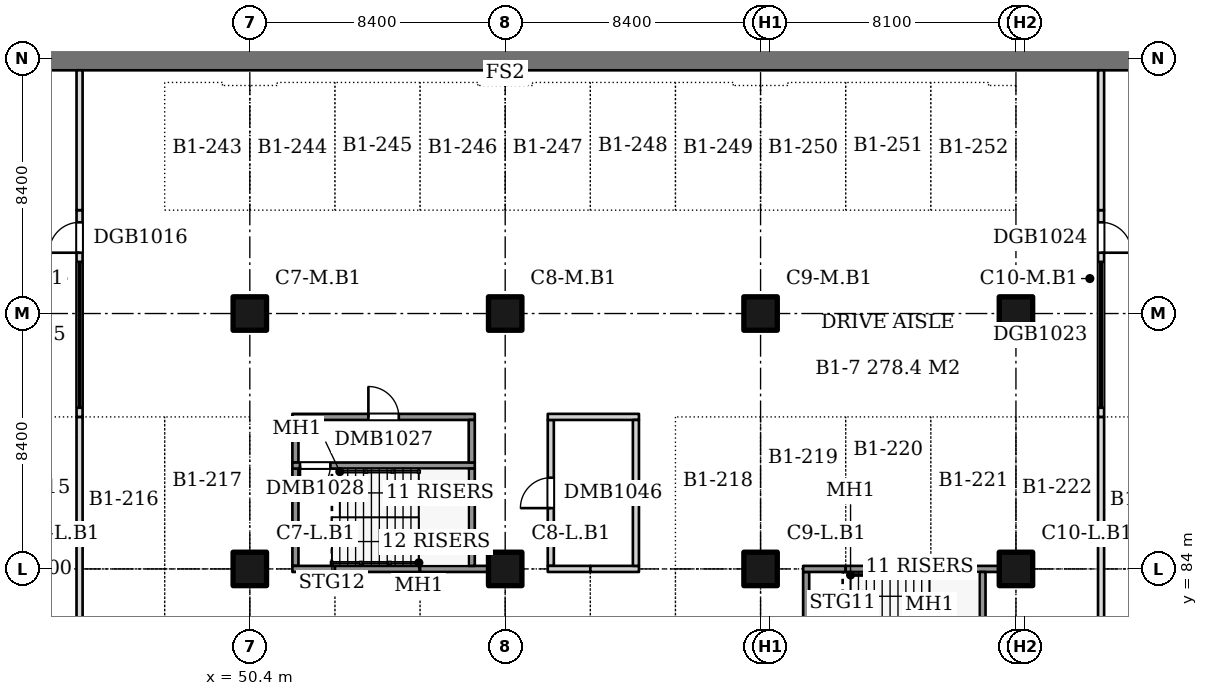
"""IFC4 building model, lengths in metres.
Left out: names, types, materials, properties, quantities, classifications, styles, units other than length and angle.
Written with IfcOpenShell. Run it as: python <this file> out.ifc"""

import sys

from ifc_helpers import new_model, si_unit, direction, frame, frame_2d, origin, origin_2d, place, context, subcontext, project, spatial, rectangle, extrude, element, fill, save


model = new_model("IFC4")
c1 = context("Model", 3, precision=1e-05, world=origin(), true_north=direction((0.0, 1.0)))
c2 = subcontext(c1, "Body", "Model", "MODEL_VIEW")
j1 = project(units=[si_unit("LENGTHUNIT", "METRE"), si_unit("PLANEANGLEUNIT", "RADIAN")], contexts=[c1])
p1 = place(None, origin())
s1 = spatial("IfcSite", under=j1, at=p1, CompositionType="ELEMENT")
p2 = place(p1, origin())
s2 = spatial("IfcBuilding", under=s1, at=p2, CompositionType="ELEMENT")
p3 = place(p2, frame((0.0, 0.0, -4.0)))
s3 = spatial("IfcBuildingStorey", under=s2, at=p3, CompositionType="ELEMENT", Elevation=-4.0)
p4 = place(p3, frame((-8.8, 100.8, 0.0), z_axis=(0.0, 0.0, 1.0), x_axis=(1.0, 0.0, 0.0)))
e1 = element("IfcWall", 1, at=p4, inside=s3, PredefinedType="SOLIDWALL", context=c2, shape_type="SweptSolid", body=[
    extrude(rectangle(XDim=135.2, YDim=0.8, at=frame_2d((67.6, 0.0))), origin(), (0.0, 0.0, 1.0), 3.6),
])
for number, where, z_axis, x_axis in (
    (2, (50.4, 84.0, 0.0), (0.0, 0.0, 1.0), (1.0, 0.0, 0.0)),
    (3, (50.4, 92.4, 0.0), (0.0, 0.0, 1.0), (1.0, 0.0, 0.0)),
    (4, (58.8, 84.0, 0.0), (0.0, 0.0, 1.0), (1.0, 0.0, 0.0)),
    (5, (58.8, 92.4, 0.0), (0.0, 0.0, 1.0), (1.0, 0.0, 0.0)),
    (6, (67.2, 84.0, 0.0), (0.0, 0.0, 1.0), (1.0, 0.0, 0.0)),
    (7, (67.2, 92.4, 0.0), (0.0, 0.0, 1.0), (1.0, 0.0, 0.0)),
    (8, (75.6, 84.0, 0.0), (0.0, 0.0, 1.0), (1.0, 0.0, 0.0)),
    (9, (75.6, 92.4, 0.0), (0.0, 0.0, 1.0), (1.0, 0.0, 0.0)),
):
    element("IfcColumn", number, at=place(p3, frame(where, z_axis=z_axis, x_axis=x_axis)), inside=s3, PredefinedType="COLUMN", context=c2, shape_type="SweptSolid", body=[
        extrude(rectangle(XDim=1.1, YDim=1.1, at=origin_2d()), origin(), (0.0, 0.0, 1.0), 3.6),
    ])
p5 = place(p3, frame((51.9, 84.1, 0.0), z_axis=(0.0, 0.0, 1.0), x_axis=(0.0, 1.0, 0.0)))
e10 = element("IfcWall", 10, at=p5, inside=s3, PredefinedType="SOLIDWALL", context=c2, shape_type="SweptSolid", body=[
    extrude(rectangle(XDim=3.2, YDim=0.2, at=frame_2d((1.6, 0.0))), origin(), (0.0, 0.0, 1.0), 4.0),
])
for number, where, z_axis, x_axis in (
    (11, (51.8, 84.0, 0.0), (0.0, 0.0, 1.0), (1.0, 0.0, 0.0)),
    (12, (51.9, 87.5, 0.0), (0.0, 0.0, 1.0), (0.0, 1.0, 0.0)),
):
    element("IfcWall", number, at=place(p3, frame(where, z_axis=z_axis, x_axis=x_axis)), inside=s3, PredefinedType="SOLIDWALL", context=c2, shape_type="SweptSolid", body=[
        extrude(rectangle(XDim=1.4, YDim=0.2, at=frame_2d((0.7, 0.0))), origin(), (0.0, 0.0, 1.0), 4.0),
    ])
p6 = place(p3, frame((51.8, 87.4, 0.0), z_axis=(0.0, 0.0, 1.0), x_axis=(1.0, 0.0, 0.0)))
e13 = element("IfcWall", 13, at=p6, inside=s3, PredefinedType="SOLIDWALL", context=c2, shape_type="SweptSolid", body=[
    extrude(rectangle(XDim=6.0, YDim=0.2, at=frame_2d((3.0, 0.0))), origin(), (0.0, 0.0, 1.0), 4.0),
])
p7 = place(p6, frame((0.25, 0.0, 0.0)))
e14 = element("IfcOpeningElement", 14, at=p7, cuts=e13, PredefinedType="OPENING", context=c2, shape_type="SweptSolid", body=[
    extrude(rectangle(XDim=1.0, YDim=2.1, at=frame_2d((0.5, 1.05))), frame((0.0, 0.11, 0.0), z_axis=(0.0, -1.0, 0.0), x_axis=(1.0, 0.0, 0.0)), (0.0, 0.0, 1.0), 0.22),
])
p8 = place(p3, frame((51.8, 89.0, 0.0), z_axis=(0.0, 0.0, 1.0), x_axis=(1.0, 0.0, 0.0)))
e15 = element("IfcWall", 15, at=p8, inside=s3, PredefinedType="SOLIDWALL", context=c2, shape_type="SweptSolid", body=[
    extrude(rectangle(XDim=6.0, YDim=0.2, at=frame_2d((3.0, 0.0))), origin(), (0.0, 0.0, 1.0), 4.0),
])
p9 = place(p8, frame((2.5, 0.0, 0.0)))
e16 = element("IfcOpeningElement", 16, at=p9, cuts=e15, PredefinedType="OPENING", context=c2, shape_type="SweptSolid", body=[
    extrude(rectangle(XDim=1.0, YDim=2.1, at=frame_2d((0.5, 1.05))), frame((0.0, 0.11, 0.0), z_axis=(0.0, -1.0, 0.0), x_axis=(1.0, 0.0, 0.0)), (0.0, 0.0, 1.0), 0.22),
])
p10 = place(p3, frame((53.2, 84.0, 0.0), z_axis=(0.0, 0.0, 1.0), x_axis=(1.0, 0.0, 0.0)))
e17 = element("IfcWall", 17, at=p10, inside=s3, PredefinedType="SOLIDWALL", context=c2, shape_type="SweptSolid", body=[
    extrude(rectangle(XDim=2.8, YDim=0.2, at=frame_2d((1.4, 0.0))), origin(), (0.0, 0.0, 1.0), 4.0),
])
p11 = place(p3, frame((56.0, 84.0, 0.0), z_axis=(0.0, 0.0, 1.0), x_axis=(1.0, 0.0, 0.0)))
e18 = element("IfcWall", 18, at=p11, inside=s3, PredefinedType="SOLIDWALL", context=c2, shape_type="SweptSolid", body=[
    extrude(rectangle(XDim=2.25, YDim=0.2, at=frame_2d((1.125, 0.0))), origin(), (0.0, 0.0, 1.0), 4.0),
])
p12 = place(p3, frame((57.7, 84.1, 0.0), z_axis=(0.0, 0.0, 1.0), x_axis=(0.0, 1.0, 0.0)))
e19 = element("IfcWall", 19, at=p12, inside=s3, PredefinedType="SOLIDWALL", context=c2, shape_type="SweptSolid", body=[
    extrude(rectangle(XDim=3.2, YDim=0.2, at=frame_2d((1.6, 0.0))), origin(), (0.0, 0.0, 1.0), 4.0),
])
p13 = place(p3, frame((57.7, 87.5, 0.0), z_axis=(0.0, 0.0, 1.0), x_axis=(0.0, 1.0, 0.0)))
e20 = element("IfcWall", 20, at=p13, inside=s3, PredefinedType="SOLIDWALL", context=c2, shape_type="SweptSolid", body=[
    extrude(rectangle(XDim=1.4, YDim=0.2, at=frame_2d((0.7, 0.0))), origin(), (0.0, 0.0, 1.0), 4.0),
])
p14 = place(p3, frame((60.3, 84.1, 0.0), z_axis=(0.0, 0.0, 1.0), x_axis=(0.0, 1.0, 0.0)))
e21 = element("IfcWall", 21, at=p14, inside=s3, PredefinedType="PARTITIONING", context=c2, shape_type="SweptSolid", body=[
    extrude(rectangle(XDim=4.8, YDim=0.2, at=frame_2d((2.4, 0.0))), origin(), (0.0, 0.0, 1.0), 3.6),
])
p15 = place(p14, frame((1.9, 0.0, 0.0)))
e22 = element("IfcOpeningElement", 22, at=p15, cuts=e21, PredefinedType="OPENING", context=c2, shape_type="SweptSolid", body=[
    extrude(rectangle(XDim=1.0, YDim=2.1, at=frame_2d((0.5, 1.05))), frame((0.0, 0.11, 0.0), z_axis=(0.0, -1.0, 0.0), x_axis=(1.0, 0.0, 0.0)), (0.0, 0.0, 1.0), 0.22),
])
p16 = place(p3, frame((60.2, 84.0, 0.0), z_axis=(0.0, 0.0, 1.0), x_axis=(1.0, 0.0, 0.0)))
e23 = element("IfcWall", 23, at=p16, inside=s3, PredefinedType="PARTITIONING", context=c2, shape_type="SweptSolid", body=[
    extrude(rectangle(XDim=1.4, YDim=0.2, at=frame_2d((0.7, 0.0))), origin(), (0.0, 0.0, 1.0), 3.6),
])
p17 = place(p3, frame((60.2, 89.0, 0.0), z_axis=(0.0, 0.0, 1.0), x_axis=(1.0, 0.0, 0.0)))
e24 = element("IfcWall", 24, at=p17, inside=s3, PredefinedType="PARTITIONING", context=c2, shape_type="SweptSolid", body=[
    extrude(rectangle(XDim=3.0, YDim=0.2, at=frame_2d((1.5, 0.0))), origin(), (0.0, 0.0, 1.0), 3.6),
])
p18 = place(p3, frame((61.6, 84.0, 0.0), z_axis=(0.0, 0.0, 1.0), x_axis=(1.0, 0.0, 0.0)))
e25 = element("IfcWall", 25, at=p18, inside=s3, PredefinedType="PARTITIONING", context=c2, shape_type="SweptSolid", body=[
    extrude(rectangle(XDim=1.6, YDim=0.2, at=frame_2d((0.8, 0.0))), origin(), (0.0, 0.0, 1.0), 3.6),
])
p19 = place(p3, frame((63.1, 84.1, 0.0), z_axis=(0.0, 0.0, 1.0), x_axis=(0.0, 1.0, 0.0)))
e26 = element("IfcWall", 26, at=p19, inside=s3, PredefinedType="PARTITIONING", context=c2, shape_type="SweptSolid", body=[
    extrude(rectangle(XDim=4.8, YDim=0.2, at=frame_2d((2.4, 0.0))), origin(), (0.0, 0.0, 1.0), 3.6),
])
p20 = place(p3, frame((68.7, 80.7, 0.0), z_axis=(0.0, 0.0, 1.0), x_axis=(0.0, 1.0, 0.0)))
e27 = element("IfcWall", 27, at=p20, inside=s3, PredefinedType="SOLIDWALL", context=c2, shape_type="SweptSolid", body=[
    extrude(rectangle(XDim=3.2, YDim=0.2, at=frame_2d((1.6, 0.0))), origin(), (0.0, 0.0, 1.0), 4.0),
])
p21 = place(p3, frame((68.6, 84.0, 0.0), z_axis=(0.0, 0.0, 1.0), x_axis=(1.0, 0.0, 0.0)))
e28 = element("IfcWall", 28, at=p21, inside=s3, PredefinedType="SOLIDWALL", context=c2, shape_type="SweptSolid", body=[
    extrude(rectangle(XDim=1.4, YDim=0.2, at=frame_2d((0.7, 0.0))), origin(), (0.0, 0.0, 1.0), 4.0),
])
p22 = place(p3, frame((70.0, 84.0, 0.0), z_axis=(0.0, 0.0, 1.0), x_axis=(1.0, 0.0, 0.0)))
e29 = element("IfcWall", 29, at=p22, inside=s3, PredefinedType="SOLIDWALL", context=c2, shape_type="SweptSolid", body=[
    extrude(rectangle(XDim=2.8, YDim=0.2, at=frame_2d((1.4, 0.0))), origin(), (0.0, 0.0, 1.0), 4.0),
])
p23 = place(p3, frame((72.8, 84.0, 0.0), z_axis=(0.0, 0.0, 1.0), x_axis=(1.0, 0.0, 0.0)))
e30 = element("IfcWall", 30, at=p23, inside=s3, PredefinedType="SOLIDWALL", context=c2, shape_type="SweptSolid", body=[
    extrude(rectangle(XDim=2.25, YDim=0.2, at=frame_2d((1.125, 0.0))), origin(), (0.0, 0.0, 1.0), 4.0),
])
p24 = place(p3, frame((74.5, 80.7, 0.0), z_axis=(0.0, 0.0, 1.0), x_axis=(0.0, 1.0, 0.0)))
e31 = element("IfcWall", 31, at=p24, inside=s3, PredefinedType="SOLIDWALL", context=c2, shape_type="SweptSolid", body=[
    extrude(rectangle(XDim=3.2, YDim=0.2, at=frame_2d((1.6, 0.0))), origin(), (0.0, 0.0, 1.0), 4.0),
])
p25 = place(p3, frame((44.8, 79.0, 0.0), z_axis=(0.0, 0.0, 1.0), x_axis=(0.0, 1.0, 0.0)))
e32 = element("IfcWall", 32, at=p25, inside=s3, PredefinedType="PARTITIONING", context=c2, shape_type="SweptSolid", body=[
    extrude(rectangle(XDim=10.0, YDim=0.2, at=frame_2d((5.0, 0.0))), origin(), (0.0, 0.0, 1.0), 3.6),
])
p26 = place(p3, frame((44.8, 89.0, 0.0), z_axis=(0.0, 0.0, 1.0), x_axis=(0.0, 1.0, 0.0)))
e33 = element("IfcWall", 33, at=p26, inside=s3, PredefinedType="PARTITIONING", context=c2, shape_type="SweptSolid", body=[
    extrude(rectangle(XDim=6.8, YDim=0.2, at=frame_2d((3.4, 0.0))), origin(), (0.0, 0.0, 1.0), 3.6),
])
p27 = place(p26, frame((0.3, 0.0, 0.0)))
e34 = element("IfcOpeningElement", 34, at=p27, cuts=e33, PredefinedType="OPENING", context=c2, shape_type="SweptSolid", body=[
    extrude(rectangle(XDim=4.8, YDim=2.4, at=frame_2d((2.4, 1.2))), frame((0.0, 0.11, 0.0), z_axis=(0.0, -1.0, 0.0), x_axis=(1.0, 0.0, 0.0)), (0.0, 0.0, 1.0), 0.22),
])
p28 = place(p26, frame((5.4, 0.0, 0.0)))
e35 = element("IfcOpeningElement", 35, at=p28, cuts=e33, PredefinedType="OPENING", context=c2, shape_type="SweptSolid", body=[
    extrude(rectangle(XDim=1.0, YDim=2.1, at=frame_2d((0.5, 1.05))), frame((0.0, 0.11, 0.0), z_axis=(0.0, -1.0, 0.0), x_axis=(1.0, 0.0, 0.0)), (0.0, 0.0, 1.0), 0.22),
])
p29 = place(p3, frame((44.8, 95.8, 0.0), z_axis=(0.0, 0.0, 1.0), x_axis=(0.0, 1.0, 0.0)))
e36 = element("IfcWall", 36, at=p29, inside=s3, PredefinedType="PARTITIONING", context=c2, shape_type="SweptSolid", body=[
    extrude(rectangle(XDim=4.6, YDim=0.2, at=frame_2d((2.3, 0.0))), origin(), (0.0, 0.0, 1.0), 3.6),
])
p30 = place(p3, frame((78.4, 79.0, 0.0), z_axis=(0.0, 0.0, 1.0), x_axis=(0.0, 1.0, 0.0)))
e37 = element("IfcWall", 37, at=p30, inside=s3, PredefinedType="PARTITIONING", context=c2, shape_type="SweptSolid", body=[
    extrude(rectangle(XDim=10.0, YDim=0.2, at=frame_2d((5.0, 0.0))), origin(), (0.0, 0.0, 1.0), 3.6),
])
p31 = place(p3, frame((78.4, 89.0, 0.0), z_axis=(0.0, 0.0, 1.0), x_axis=(0.0, 1.0, 0.0)))
e38 = element("IfcWall", 38, at=p31, inside=s3, PredefinedType="PARTITIONING", context=c2, shape_type="SweptSolid", body=[
    extrude(rectangle(XDim=6.8, YDim=0.2, at=frame_2d((3.4, 0.0))), origin(), (0.0, 0.0, 1.0), 3.6),
])
p32 = place(p31, frame((0.3, 0.0, 0.0)))
e39 = element("IfcOpeningElement", 39, at=p32, cuts=e38, PredefinedType="OPENING", context=c2, shape_type="SweptSolid", body=[
    extrude(rectangle(XDim=4.8, YDim=2.4, at=frame_2d((2.4, 1.2))), frame((0.0, 0.11, 0.0), z_axis=(0.0, -1.0, 0.0), x_axis=(1.0, 0.0, 0.0)), (0.0, 0.0, 1.0), 0.22),
])
p33 = place(p31, frame((5.4, 0.0, 0.0)))
e40 = element("IfcOpeningElement", 40, at=p33, cuts=e38, PredefinedType="OPENING", context=c2, shape_type="SweptSolid", body=[
    extrude(rectangle(XDim=1.0, YDim=2.1, at=frame_2d((0.5, 1.05))), frame((0.0, 0.11, 0.0), z_axis=(0.0, -1.0, 0.0), x_axis=(1.0, 0.0, 0.0)), (0.0, 0.0, 1.0), 0.22),
])
p34 = place(p3, frame((78.4, 95.8, 0.0), z_axis=(0.0, 0.0, 1.0), x_axis=(0.0, 1.0, 0.0)))
e41 = element("IfcWall", 41, at=p34, inside=s3, PredefinedType="PARTITIONING", context=c2, shape_type="SweptSolid", body=[
    extrude(rectangle(XDim=4.6, YDim=0.2, at=frame_2d((2.3, 0.0))), origin(), (0.0, 0.0, 1.0), 3.6),
])
p35 = place(p9, origin())
e42 = element("IfcDoor", 42, at=p35, inside=s3, OperationType="SINGLE_SWING_LEFT", PredefinedType="DOOR", context=c2, shape_type="SweptSolid", body=[
    extrude(rectangle(XDim=1.0, YDim=2.1, at=frame_2d((0.5, 1.05))), frame((0.0, 0.025, 0.0), z_axis=(0.0, -1.0, 0.0), x_axis=(1.0, 0.0, 0.0)), (0.0, 0.0, 1.0), 0.05),
])
fill(e16, e42)
p36 = place(p7, frame((1.0, 0.0, 0.0), z_axis=(0.0, 0.0, 1.0), x_axis=(-1.0, 0.0, 0.0)))
e43 = element("IfcDoor", 43, at=p36, inside=s3, OperationType="SINGLE_SWING_RIGHT", PredefinedType="DOOR", context=c2, shape_type="SweptSolid", body=[
    extrude(rectangle(XDim=1.0, YDim=2.1, at=frame_2d((0.5, 1.05))), frame((0.0, 0.025, 0.0), z_axis=(0.0, -1.0, 0.0), x_axis=(1.0, 0.0, 0.0)), (0.0, 0.0, 1.0), 0.05),
])
fill(e14, e43)
p37 = place(p15, origin())
e44 = element("IfcDoor", 44, at=p37, inside=s3, OperationType="SINGLE_SWING_LEFT", PredefinedType="DOOR", context=c2, shape_type="SweptSolid", body=[
    extrude(rectangle(XDim=1.0, YDim=2.1, at=frame_2d((0.5, 1.05))), frame((0.0, 0.025, 0.0), z_axis=(0.0, -1.0, 0.0), x_axis=(1.0, 0.0, 0.0)), (0.0, 0.0, 1.0), 0.05),
])
fill(e22, e44)
p38 = place(p27, origin())
e45 = element("IfcDoor", 45, at=p38, inside=s3, OperationType="ROLLINGUP", PredefinedType="GATE", context=c2, shape_type="SweptSolid", body=[
    extrude(rectangle(XDim=4.8, YDim=2.4, at=frame_2d((2.4, 1.2))), frame((0.0, 0.025, 0.0), z_axis=(0.0, -1.0, 0.0), x_axis=(1.0, 0.0, 0.0)), (0.0, 0.0, 1.0), 0.05),
])
fill(e34, e45)
p39 = place(p28, origin())
e46 = element("IfcDoor", 46, at=p39, inside=s3, OperationType="SINGLE_SWING_LEFT", PredefinedType="DOOR", context=c2, shape_type="SweptSolid", body=[
    extrude(rectangle(XDim=1.0, YDim=2.1, at=frame_2d((0.5, 1.05))), frame((0.0, 0.025, 0.0), z_axis=(0.0, -1.0, 0.0), x_axis=(1.0, 0.0, 0.0)), (0.0, 0.0, 1.0), 0.05),
])
fill(e35, e46)
p40 = place(p32, origin())
e47 = element("IfcDoor", 47, at=p40, inside=s3, OperationType="ROLLINGUP", PredefinedType="GATE", context=c2, shape_type="SweptSolid", body=[
    extrude(rectangle(XDim=4.8, YDim=2.4, at=frame_2d((2.4, 1.2))), frame((0.0, 0.025, 0.0), z_axis=(0.0, -1.0, 0.0), x_axis=(1.0, 0.0, 0.0)), (0.0, 0.0, 1.0), 0.05),
])
fill(e39, e47)
p41 = place(p33, frame((1.0, 0.0, 0.0), z_axis=(0.0, 0.0, 1.0), x_axis=(-1.0, 0.0, 0.0)))
e48 = element("IfcDoor", 48, at=p41, inside=s3, OperationType="SINGLE_SWING_RIGHT", PredefinedType="DOOR", context=c2, shape_type="SweptSolid", body=[
    extrude(rectangle(XDim=1.0, YDim=2.1, at=frame_2d((0.5, 1.05))), frame((0.0, 0.025, 0.0), z_axis=(0.0, -1.0, 0.0), x_axis=(1.0, 0.0, 0.0)), (0.0, 0.0, 1.0), 0.05),
])
fill(e40, e48)
save(model, sys.argv[1])
